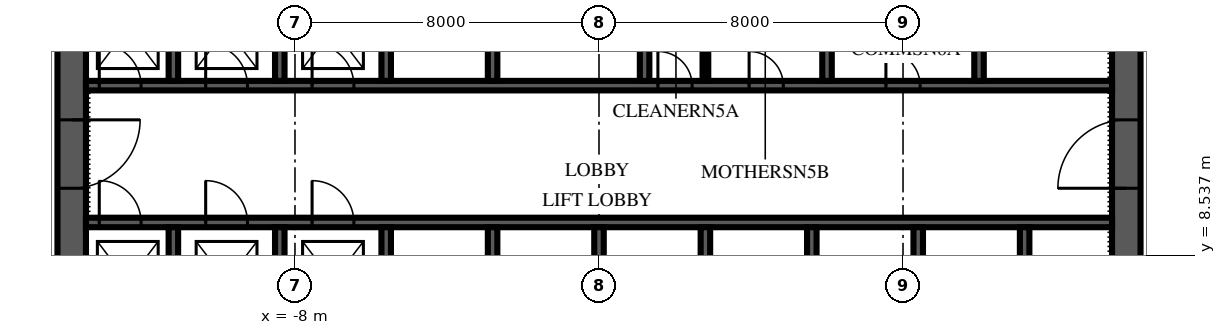
"""IFC4 building model, lengths in metres.
Left out: names, types, materials, properties, quantities, classifications, styles, units other than length and angle.
Written with IfcOpenShell. Run it as: python <this file> out.ifc"""

import sys

from ifc_helpers import new_model, si_unit, direction, frame, frame_2d, origin, place, context, subcontext, project, spatial, polyline, rectangle, outline, extrude, element, fill, save


model = new_model("IFC4")
c1 = context("Model", 3, precision=1e-05, world=origin(), true_north=direction((0.0, 1.0)))
c2 = subcontext(c1, "Body", "Model", "MODEL_VIEW")
j1 = project(units=[si_unit("LENGTHUNIT", "METRE"), si_unit("PLANEANGLEUNIT", "RADIAN")], contexts=[c1])
p1 = place(None, origin())
s1 = spatial("IfcSite", under=j1, at=p1, CompositionType="ELEMENT")
p2 = place(p1, origin())
s2 = spatial("IfcBuilding", under=s1, at=p2, CompositionType="ELEMENT")
p3 = place(p2, frame((0.0, 0.0, 151.0)))
s3 = spatial("IfcBuildingStorey", under=s2, at=p3, CompositionType="ELEMENT", Elevation=151.0)
p4 = place(p3, frame((13.875, 6.125, 0.0), z_axis=(0.0, 0.0, 1.0), x_axis=(0.0, 1.0, 0.0)))
e1 = element("IfcWall", 1, at=p4, inside=s3, PredefinedType="SHEAR", context=c2, shape_type="SweptSolid", body=[
    extrude(outline(polyline([(0.0, -0.375), (17.75, -0.375), (17.75, 0.0), (17.375, 0.0), (17.375, 0.375), (0.375, 0.375), (0.375, 0.0), (0.0, 0.0), (0.0, -0.375)])), origin(), (0.0, 0.0, 1.0), 4.0),
])
p5 = place(p4, frame((4.175, 0.0, 0.0)))
e2 = element("IfcOpeningElement", 2, at=p5, cuts=e1, PredefinedType="OPENING", context=c2, shape_type="SweptSolid", body=[
    extrude(rectangle(XDim=1.8, YDim=2.4, at=frame_2d((0.9, 1.2))), frame((0.0, 0.39, 0.0), z_axis=(0.0, -1.0, 0.0), x_axis=(1.0, 0.0, 0.0)), (0.0, 0.0, 1.0), 0.78),
])
p6 = place(p3, frame((-13.875, 23.875, 0.0), z_axis=(0.0, 0.0, 1.0), x_axis=(0.0, -1.0, 0.0)))
e3 = element("IfcWall", 3, at=p6, inside=s3, PredefinedType="SHEAR", context=c2, shape_type="SweptSolid", body=[
    extrude(outline(polyline([(0.0, -0.375), (17.75, -0.375), (17.75, 0.0), (17.375, 0.0), (17.375, 0.375), (0.375, 0.375), (0.375, 0.0), (0.0, 0.0), (0.0, -0.375)])), origin(), (0.0, 0.0, 1.0), 4.0),
])
p7 = place(p6, frame((11.775, 0.0, 0.0)))
e4 = element("IfcOpeningElement", 4, at=p7, cuts=e3, PredefinedType="OPENING", context=c2, shape_type="SweptSolid", body=[
    extrude(rectangle(XDim=1.8, YDim=2.4, at=frame_2d((0.9, 1.2))), frame((0.0, 0.39, 0.0), z_axis=(0.0, -1.0, 0.0), x_axis=(1.0, 0.0, 0.0)), (0.0, 0.0, 1.0), 0.78),
])
p8 = place(p3, frame((-13.5, 9.4, 0.0), z_axis=(0.0, 0.0, 1.0), x_axis=(1.0, 0.0, 0.0)))
e5 = element("IfcWall", 5, at=p8, inside=s3, PredefinedType="SHEAR", context=c2, shape_type="SweptSolid", body=[
    extrude(rectangle(XDim=27.0, YDim=0.25, at=frame_2d((13.5, 0.0))), origin(), (0.0, 0.0, 1.0), 4.0),
])
p9 = place(p8, frame((0.35, 0.0, 0.0)))
e6 = element("IfcOpeningElement", 6, at=p9, cuts=e5, PredefinedType="OPENING", context=c2, shape_type="SweptSolid", body=[
    extrude(rectangle(XDim=1.1, YDim=2.1, at=frame_2d((0.55, 1.05))), frame((0.0, 0.14, 0.0), z_axis=(0.0, -1.0, 0.0), x_axis=(1.0, 0.0, 0.0)), (0.0, 0.0, 1.0), 0.28),
])
p10 = place(p8, frame((3.15, 0.0, 0.0)))
e7 = element("IfcOpeningElement", 7, at=p10, cuts=e5, PredefinedType="OPENING", context=c2, shape_type="SweptSolid", body=[
    extrude(rectangle(XDim=1.1, YDim=2.1, at=frame_2d((0.55, 1.05))), frame((0.0, 0.14, 0.0), z_axis=(0.0, -1.0, 0.0), x_axis=(1.0, 0.0, 0.0)), (0.0, 0.0, 1.0), 0.28),
])
p11 = place(p8, frame((5.95, 0.0, 0.0)))
e8 = element("IfcOpeningElement", 8, at=p11, cuts=e5, PredefinedType="OPENING", context=c2, shape_type="SweptSolid", body=[
    extrude(rectangle(XDim=1.1, YDim=2.1, at=frame_2d((0.55, 1.05))), frame((0.0, 0.14, 0.0), z_axis=(0.0, -1.0, 0.0), x_axis=(1.0, 0.0, 0.0)), (0.0, 0.0, 1.0), 0.28),
])
p12 = place(p3, frame((-13.5, 13.0, 0.0), z_axis=(0.0, 0.0, 1.0), x_axis=(1.0, 0.0, 0.0)))
e9 = element("IfcWall", 9, at=p12, inside=s3, PredefinedType="SHEAR", context=c2, shape_type="SweptSolid", body=[
    extrude(rectangle(XDim=27.0, YDim=0.25, at=frame_2d((13.5, 0.0))), origin(), (0.0, 0.0, 1.0), 4.0),
])
p13 = place(p12, frame((0.35, 0.0, 0.0)))
e10 = element("IfcOpeningElement", 10, at=p13, cuts=e9, PredefinedType="OPENING", context=c2, shape_type="SweptSolid", body=[
    extrude(rectangle(XDim=1.1, YDim=2.1, at=frame_2d((0.55, 1.05))), frame((0.0, 0.14, 0.0), z_axis=(0.0, -1.0, 0.0), x_axis=(1.0, 0.0, 0.0)), (0.0, 0.0, 1.0), 0.28),
])
p14 = place(p12, frame((3.15, 0.0, 0.0)))
e11 = element("IfcOpeningElement", 11, at=p14, cuts=e9, PredefinedType="OPENING", context=c2, shape_type="SweptSolid", body=[
    extrude(rectangle(XDim=1.1, YDim=2.1, at=frame_2d((0.55, 1.05))), frame((0.0, 0.14, 0.0), z_axis=(0.0, -1.0, 0.0), x_axis=(1.0, 0.0, 0.0)), (0.0, 0.0, 1.0), 0.28),
])
p15 = place(p12, frame((5.95, 0.0, 0.0)))
e12 = element("IfcOpeningElement", 12, at=p15, cuts=e9, PredefinedType="OPENING", context=c2, shape_type="SweptSolid", body=[
    extrude(rectangle(XDim=1.1, YDim=2.1, at=frame_2d((0.55, 1.05))), frame((0.0, 0.14, 0.0), z_axis=(0.0, -1.0, 0.0), x_axis=(1.0, 0.0, 0.0)), (0.0, 0.0, 1.0), 0.28),
])
p16 = place(p12, frame((15.05, 0.0, 0.0)))
e13 = element("IfcOpeningElement", 13, at=p16, cuts=e9, PredefinedType="OPENING", context=c2, shape_type="SweptSolid", body=[
    extrude(rectangle(XDim=0.9, YDim=2.1, at=frame_2d((0.45, 1.05))), frame((0.0, 0.14, 0.0), z_axis=(0.0, -1.0, 0.0), x_axis=(1.0, 0.0, 0.0)), (0.0, 0.0, 1.0), 0.28),
])
p17 = place(p12, frame((17.45, 0.0, 0.0)))
e14 = element("IfcOpeningElement", 14, at=p17, cuts=e9, PredefinedType="OPENING", context=c2, shape_type="SweptSolid", body=[
    extrude(rectangle(XDim=0.9, YDim=2.1, at=frame_2d((0.45, 1.05))), frame((0.0, 0.14, 0.0), z_axis=(0.0, -1.0, 0.0), x_axis=(1.0, 0.0, 0.0)), (0.0, 0.0, 1.0), 0.28),
])
p18 = place(p12, frame((21.05, 0.0, 0.0)))
e15 = element("IfcOpeningElement", 15, at=p18, cuts=e9, PredefinedType="OPENING", context=c2, shape_type="SweptSolid", body=[
    extrude(rectangle(XDim=0.9, YDim=2.1, at=frame_2d((0.45, 1.05))), frame((0.0, 0.14, 0.0), z_axis=(0.0, -1.0, 0.0), x_axis=(1.0, 0.0, 0.0)), (0.0, 0.0, 1.0), 0.28),
])
for number, where, z_axis, x_axis in (
    (16, (-11.2, 6.5, 0.0), (0.0, 0.0, 1.0), (0.0, 1.0, 0.0)),
    (17, (-8.4, 6.5, 0.0), (0.0, 0.0, 1.0), (0.0, 1.0, 0.0)),
    (18, (-5.6, 6.5, 0.0), (0.0, 0.0, 1.0), (0.0, 1.0, 0.0)),
    (19, (-2.8, 6.5, 0.0), (0.0, 0.0, 1.0), (0.0, 1.0, 0.0)),
    (20, (0.0, 6.5, 0.0), (0.0, 0.0, 1.0), (0.0, 1.0, 0.0)),
    (21, (2.8, 6.5, 0.0), (0.0, 0.0, 1.0), (0.0, 1.0, 0.0)),
    (22, (5.6, 6.5, 0.0), (0.0, 0.0, 1.0), (0.0, 1.0, 0.0)),
    (23, (8.4, 6.5, 0.0), (0.0, 0.0, 1.0), (0.0, 1.0, 0.0)),
    (24, (11.2, 6.5, 0.0), (0.0, 0.0, 1.0), (0.0, 1.0, 0.0)),
):
    element("IfcWall", number, at=place(p3, frame(where, z_axis=z_axis, x_axis=x_axis)), inside=s3, PredefinedType="SHEAR", context=c2, shape_type="SweptSolid", body=[
        extrude(rectangle(XDim=2.775, YDim=0.25, at=frame_2d((1.387, 0.0))), origin(), (0.0, 0.0, 1.0), 4.0),
    ])
for number, where, z_axis, x_axis in (
    (25, (-11.2, 13.125, 0.0), (0.0, 0.0, 1.0), (0.0, 1.0, 0.0)),
    (26, (-8.4, 13.125, 0.0), (0.0, 0.0, 1.0), (0.0, 1.0, 0.0)),
    (27, (-5.6, 13.125, 0.0), (0.0, 0.0, 1.0), (0.0, 1.0, 0.0)),
    (28, (-2.8, 13.125, 0.0), (0.0, 0.0, 1.0), (0.0, 1.0, 0.0)),
    (29, (1.2, 13.125, 0.0), (0.0, 0.0, 1.0), (0.0, 1.0, 0.0)),
    (30, (6.0, 13.125, 0.0), (0.0, 0.0, 1.0), (0.0, 1.0, 0.0)),
    (31, (10.0, 13.125, 0.0), (0.0, 0.0, 1.0), (0.0, 1.0, 0.0)),
):
    element("IfcWall", number, at=place(p3, frame(where, z_axis=z_axis, x_axis=x_axis)), inside=s3, PredefinedType="SHEAR", context=c2, shape_type="SweptSolid", body=[
        extrude(rectangle(XDim=2.75, YDim=0.25, at=frame_2d((1.375, 0.0))), origin(), (0.0, 0.0, 1.0), 4.0),
    ])
p19 = place(p3, frame((2.8, 13.125, 0.0), z_axis=(0.0, 0.0, 1.0), x_axis=(0.0, 1.0, 0.0)))
e32 = element("IfcWall", 32, at=p19, inside=s3, PredefinedType="PARTITIONING", context=c2, shape_type="SweptSolid", body=[
    extrude(rectangle(XDim=2.75, YDim=0.15, at=frame_2d((1.375, 0.0))), origin(), (0.0, 0.0, 1.0), 3.85),
])
p20 = place(p5, origin())
e33 = element("IfcDoor", 33, at=p20, inside=s3, OperationType="DOUBLE_DOOR_SINGLE_SWING", PredefinedType="DOOR", context=c2, shape_type="SweptSolid", body=[
    extrude(rectangle(XDim=1.8, YDim=2.4, at=frame_2d((0.9, 1.2))), frame((0.0, 0.375, 0.0), z_axis=(0.0, -1.0, 0.0), x_axis=(1.0, 0.0, 0.0)), (0.0, 0.0, 1.0), 0.75),
])
fill(e2, e33)
p21 = place(p7, origin())
e34 = element("IfcDoor", 34, at=p21, inside=s3, OperationType="DOUBLE_DOOR_SINGLE_SWING", PredefinedType="DOOR", context=c2, shape_type="SweptSolid", body=[
    extrude(rectangle(XDim=1.8, YDim=2.4, at=frame_2d((0.9, 1.2))), frame((0.0, 0.375, 0.0), z_axis=(0.0, -1.0, 0.0), x_axis=(1.0, 0.0, 0.0)), (0.0, 0.0, 1.0), 0.75),
])
fill(e4, e34)
p22 = place(p9, origin())
e35 = element("IfcDoor", 35, at=p22, inside=s3, OperationType="SLIDING_TO_LEFT", PredefinedType="DOOR", context=c2, shape_type="SweptSolid", body=[
    extrude(rectangle(XDim=1.1, YDim=2.1, at=frame_2d((0.55, 1.05))), frame((0.0, 0.125, 0.0), z_axis=(0.0, -1.0, 0.0), x_axis=(1.0, 0.0, 0.0)), (0.0, 0.0, 1.0), 0.25),
])
fill(e6, e35)
p23 = place(p10, origin())
e36 = element("IfcDoor", 36, at=p23, inside=s3, OperationType="SLIDING_TO_LEFT", PredefinedType="DOOR", context=c2, shape_type="SweptSolid", body=[
    extrude(rectangle(XDim=1.1, YDim=2.1, at=frame_2d((0.55, 1.05))), frame((0.0, 0.125, 0.0), z_axis=(0.0, -1.0, 0.0), x_axis=(1.0, 0.0, 0.0)), (0.0, 0.0, 1.0), 0.25),
])
fill(e7, e36)
p24 = place(p11, origin())
e37 = element("IfcDoor", 37, at=p24, inside=s3, OperationType="SLIDING_TO_LEFT", PredefinedType="DOOR", context=c2, shape_type="SweptSolid", body=[
    extrude(rectangle(XDim=1.1, YDim=2.1, at=frame_2d((0.55, 1.05))), frame((0.0, 0.125, 0.0), z_axis=(0.0, -1.0, 0.0), x_axis=(1.0, 0.0, 0.0)), (0.0, 0.0, 1.0), 0.25),
])
fill(e8, e37)
p25 = place(p13, origin())
e38 = element("IfcDoor", 38, at=p25, inside=s3, OperationType="SLIDING_TO_LEFT", PredefinedType="DOOR", context=c2, shape_type="SweptSolid", body=[
    extrude(rectangle(XDim=1.1, YDim=2.1, at=frame_2d((0.55, 1.05))), frame((0.0, 0.125, 0.0), z_axis=(0.0, -1.0, 0.0), x_axis=(1.0, 0.0, 0.0)), (0.0, 0.0, 1.0), 0.25),
])
fill(e10, e38)
p26 = place(p14, origin())
e39 = element("IfcDoor", 39, at=p26, inside=s3, OperationType="SLIDING_TO_LEFT", PredefinedType="DOOR", context=c2, shape_type="SweptSolid", body=[
    extrude(rectangle(XDim=1.1, YDim=2.1, at=frame_2d((0.55, 1.05))), frame((0.0, 0.125, 0.0), z_axis=(0.0, -1.0, 0.0), x_axis=(1.0, 0.0, 0.0)), (0.0, 0.0, 1.0), 0.25),
])
fill(e11, e39)
p27 = place(p15, origin())
e40 = element("IfcDoor", 40, at=p27, inside=s3, OperationType="SLIDING_TO_LEFT", PredefinedType="DOOR", context=c2, shape_type="SweptSolid", body=[
    extrude(rectangle(XDim=1.1, YDim=2.1, at=frame_2d((0.55, 1.05))), frame((0.0, 0.125, 0.0), z_axis=(0.0, -1.0, 0.0), x_axis=(1.0, 0.0, 0.0)), (0.0, 0.0, 1.0), 0.25),
])
fill(e12, e40)
p28 = place(p16, origin())
e41 = element("IfcDoor", 41, at=p28, inside=s3, OperationType="SINGLE_SWING_LEFT", PredefinedType="DOOR", context=c2, shape_type="SweptSolid", body=[
    extrude(rectangle(XDim=0.9, YDim=2.1, at=frame_2d((0.45, 1.05))), frame((0.0, 0.125, 0.0), z_axis=(0.0, -1.0, 0.0), x_axis=(1.0, 0.0, 0.0)), (0.0, 0.0, 1.0), 0.25),
])
fill(e13, e41)
p29 = place(p17, origin())
e42 = element("IfcDoor", 42, at=p29, inside=s3, OperationType="SINGLE_SWING_LEFT", PredefinedType="DOOR", context=c2, shape_type="SweptSolid", body=[
    extrude(rectangle(XDim=0.9, YDim=2.1, at=frame_2d((0.45, 1.05))), frame((0.0, 0.125, 0.0), z_axis=(0.0, -1.0, 0.0), x_axis=(1.0, 0.0, 0.0)), (0.0, 0.0, 1.0), 0.25),
])
fill(e14, e42)
p30 = place(p18, origin())
e43 = element("IfcDoor", 43, at=p30, inside=s3, OperationType="SINGLE_SWING_LEFT", PredefinedType="DOOR", context=c2, shape_type="SweptSolid", body=[
    extrude(rectangle(XDim=0.9, YDim=2.1, at=frame_2d((0.45, 1.05))), frame((0.0, 0.125, 0.0), z_axis=(0.0, -1.0, 0.0), x_axis=(1.0, 0.0, 0.0)), (0.0, 0.0, 1.0), 0.25),
])
fill(e15, e43)
save(model, sys.argv[1])
